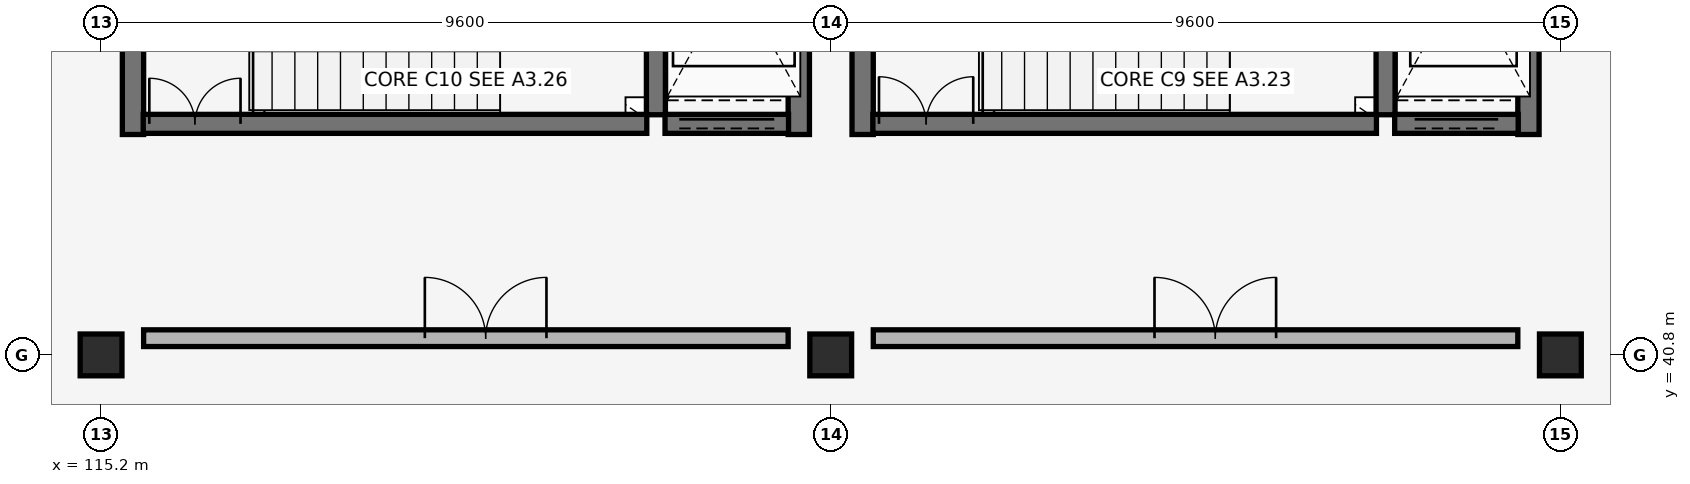
"""IFC4 building model, lengths in metres.
Left out: names, types, materials, properties, quantities, classifications, styles, units other than length and angle.
Written with IfcOpenShell. Run it as: python <this file> out.ifc"""

import sys

from ifc_helpers import new_model, si_unit, direction, frame, frame_2d, origin, origin_2d, place, context, subcontext, project, spatial, rectangle, extrude, element, fill, save


model = new_model("IFC4")
c1 = context("Model", 3, precision=1e-05, world=origin(), true_north=direction((0.0, 1.0)))
c2 = subcontext(c1, "Body", "Model", "MODEL_VIEW")
j1 = project(units=[si_unit("LENGTHUNIT", "METRE"), si_unit("PLANEANGLEUNIT", "RADIAN")], contexts=[c1])
p1 = place(None, origin())
s1 = spatial("IfcSite", under=j1, at=p1, CompositionType="ELEMENT")
p2 = place(p1, origin())
s2 = spatial("IfcBuilding", under=s1, at=p2, CompositionType="ELEMENT")
p3 = place(p2, frame((0.0, 0.0, 12.58)))
s3 = spatial("IfcBuildingStorey", under=s2, at=p3, CompositionType="ELEMENT", Elevation=12.58)
for number, where, z_axis, x_axis in (
    (1, (115.2, 40.8, 0.0), (0.0, 0.0, 1.0), (1.0, 0.0, 0.0)),
    (2, (124.8, 40.8, 0.0), (0.0, 0.0, 1.0), (1.0, 0.0, 0.0)),
    (3, (134.4, 40.8, 0.0), (0.0, 0.0, 1.0), (1.0, 0.0, 0.0)),
):
    element("IfcColumn", number, at=place(p3, frame(where, z_axis=z_axis, x_axis=x_axis)), inside=s3, PredefinedType="COLUMN", context=c2, shape_type="SweptSolid", body=[
        extrude(rectangle(XDim=0.55, YDim=0.55, at=origin_2d()), origin(), (0.0, 0.0, 1.0), 4.08),
    ])
for number, where, z_axis, x_axis in (
    (4, (125.22, 43.7, 0.0), (0.0, 0.0, 1.0), (0.0, 1.0, 0.0)),
    (5, (133.98, 43.7, 0.0), (0.0, 0.0, 1.0), (0.0, 1.0, 0.0)),
):
    element("IfcWall", number, at=place(p3, frame(where, z_axis=z_axis, x_axis=x_axis)), inside=s3, PredefinedType="SHEAR", context=c2, shape_type="SweptSolid", body=[
        extrude(rectangle(XDim=4.08, YDim=0.28, at=frame_2d((2.04, 0.0))), origin(), (0.0, 0.0, 1.0), 3.78),
    ])
p4 = place(p3, frame((132.1, 43.96, 0.0), z_axis=(0.0, 0.0, 1.0), x_axis=(0.0, 1.0, 0.0)))
e6 = element("IfcWall", 6, at=p4, inside=s3, PredefinedType="SHEAR", context=c2, shape_type="SweptSolid", body=[
    extrude(rectangle(XDim=3.54, YDim=0.25, at=frame_2d((1.77, 0.0))), origin(), (0.0, 0.0, 1.0), 3.78),
])
p5 = place(p3, frame((125.355, 43.84, 0.0), z_axis=(0.0, 0.0, 1.0), x_axis=(1.0, 0.0, 0.0)))
e7 = element("IfcWall", 7, at=p5, inside=s3, PredefinedType="SHEAR", context=c2, shape_type="SweptSolid", body=[
    extrude(rectangle(XDim=6.625, YDim=0.25, at=frame_2d((3.312, 0.0))), origin(), (0.0, 0.0, 1.0), 3.78),
])
p6 = place(p5, frame((0.08, 0.0, 0.0)))
e8 = element("IfcOpeningElement", 8, at=p6, cuts=e7, PredefinedType="OPENING", context=c2, shape_type="SweptSolid", body=[
    extrude(rectangle(XDim=1.24, YDim=2.15, at=frame_2d((0.62, 1.075))), frame((0.0, 0.135, 0.0), z_axis=(0.0, -1.0, 0.0), x_axis=(1.0, 0.0, 0.0)), (0.0, 0.0, 1.0), 0.27),
])
p7 = place(p3, frame((125.36, 41.02, 0.0), z_axis=(0.0, 0.0, 1.0), x_axis=(1.0, 0.0, 0.0)))
e9 = element("IfcWall", 9, at=p7, inside=s3, PredefinedType="PARTITIONING", context=c2, shape_type="SweptSolid", body=[
    extrude(rectangle(XDim=8.48, YDim=0.22, at=frame_2d((4.24, 0.0))), origin(), (0.0, 0.0, 1.0), 3.06),
])
p8 = place(p7, frame((3.7, 0.0, 0.0)))
e10 = element("IfcOpeningElement", 10, at=p8, cuts=e9, PredefinedType="OPENING", context=c2, shape_type="SweptSolid", body=[
    extrude(rectangle(XDim=1.6, YDim=2.2, at=frame_2d((0.8, 1.1))), frame((0.0, 0.12, 0.0), z_axis=(0.0, -1.0, 0.0), x_axis=(1.0, 0.0, 0.0)), (0.0, 0.0, 1.0), 0.24),
])
p9 = place(p3, frame((132.22, 43.84, 0.0), z_axis=(0.0, 0.0, 1.0), x_axis=(1.0, 0.0, 0.0)))
e11 = element("IfcWall", 11, at=p9, inside=s3, PredefinedType="SHEAR", context=c2, shape_type="SweptSolid", body=[
    extrude(rectangle(XDim=1.625, YDim=0.25, at=frame_2d((0.812, 0.0))), origin(), (0.0, 0.0, 1.0), 3.78),
])
p10 = place(p9, frame((0.262, 0.0, 0.0)))
e12 = element("IfcOpeningElement", 12, at=p10, cuts=e11, PredefinedType="OPENING", context=c2, shape_type="SweptSolid", body=[
    extrude(rectangle(XDim=1.1, YDim=2.15, at=frame_2d((0.55, 1.075))), frame((0.0, 0.135, 0.0), z_axis=(0.0, -1.0, 0.0), x_axis=(1.0, 0.0, 0.0)), (0.0, 0.0, 1.0), 0.27),
])
for number, where, z_axis, x_axis in (
    (13, (115.62, 43.7, 0.0), (0.0, 0.0, 1.0), (0.0, 1.0, 0.0)),
    (14, (124.38, 43.7, 0.0), (0.0, 0.0, 1.0), (0.0, 1.0, 0.0)),
):
    element("IfcWall", number, at=place(p3, frame(where, z_axis=z_axis, x_axis=x_axis)), inside=s3, PredefinedType="SHEAR", context=c2, shape_type="SweptSolid", body=[
        extrude(rectangle(XDim=4.08, YDim=0.28, at=frame_2d((2.04, 0.0))), origin(), (0.0, 0.0, 1.0), 3.78),
    ])
p11 = place(p3, frame((122.5, 43.96, 0.0), z_axis=(0.0, 0.0, 1.0), x_axis=(0.0, 1.0, 0.0)))
e15 = element("IfcWall", 15, at=p11, inside=s3, PredefinedType="SHEAR", context=c2, shape_type="SweptSolid", body=[
    extrude(rectangle(XDim=3.54, YDim=0.25, at=frame_2d((1.77, 0.0))), origin(), (0.0, 0.0, 1.0), 3.78),
])
p12 = place(p3, frame((115.755, 43.84, 0.0), z_axis=(0.0, 0.0, 1.0), x_axis=(1.0, 0.0, 0.0)))
e16 = element("IfcWall", 16, at=p12, inside=s3, PredefinedType="SHEAR", context=c2, shape_type="SweptSolid", body=[
    extrude(rectangle(XDim=6.625, YDim=0.25, at=frame_2d((3.312, 0.0))), origin(), (0.0, 0.0, 1.0), 3.78),
])
p13 = place(p12, frame((0.08, 0.0, 0.0)))
e17 = element("IfcOpeningElement", 17, at=p13, cuts=e16, PredefinedType="OPENING", context=c2, shape_type="SweptSolid", body=[
    extrude(rectangle(XDim=1.2, YDim=2.15, at=frame_2d((0.6, 1.075))), frame((0.0, 0.135, 0.0), z_axis=(0.0, -1.0, 0.0), x_axis=(1.0, 0.0, 0.0)), (0.0, 0.0, 1.0), 0.27),
])
p14 = place(p3, frame((115.76, 41.02, 0.0), z_axis=(0.0, 0.0, 1.0), x_axis=(1.0, 0.0, 0.0)))
e18 = element("IfcWall", 18, at=p14, inside=s3, PredefinedType="PARTITIONING", context=c2, shape_type="SweptSolid", body=[
    extrude(rectangle(XDim=8.48, YDim=0.22, at=frame_2d((4.24, 0.0))), origin(), (0.0, 0.0, 1.0), 3.06),
])
p15 = place(p14, frame((3.7, 0.0, 0.0)))
e19 = element("IfcOpeningElement", 19, at=p15, cuts=e18, PredefinedType="OPENING", context=c2, shape_type="SweptSolid", body=[
    extrude(rectangle(XDim=1.6, YDim=2.2, at=frame_2d((0.8, 1.1))), frame((0.0, 0.12, 0.0), z_axis=(0.0, -1.0, 0.0), x_axis=(1.0, 0.0, 0.0)), (0.0, 0.0, 1.0), 0.24),
])
p16 = place(p3, frame((122.62, 43.84, 0.0), z_axis=(0.0, 0.0, 1.0), x_axis=(1.0, 0.0, 0.0)))
e20 = element("IfcWall", 20, at=p16, inside=s3, PredefinedType="SHEAR", context=c2, shape_type="SweptSolid", body=[
    extrude(rectangle(XDim=1.625, YDim=0.25, at=frame_2d((0.812, 0.0))), origin(), (0.0, 0.0, 1.0), 3.78),
])
p17 = place(p16, frame((0.188, 0.0, 0.0)))
e21 = element("IfcOpeningElement", 21, at=p17, cuts=e20, PredefinedType="OPENING", context=c2, shape_type="SweptSolid", body=[
    extrude(rectangle(XDim=1.25, YDim=2.15, at=frame_2d((0.625, 1.075))), frame((0.0, 0.135, 0.0), z_axis=(0.0, -1.0, 0.0), x_axis=(1.0, 0.0, 0.0)), (0.0, 0.0, 1.0), 0.27),
])
p18 = place(p6, origin())
e22 = element("IfcDoor", 22, at=p18, inside=s3, OperationType="DOUBLE_DOOR_SINGLE_SWING", PredefinedType="DOOR", context=c2, shape_type="SweptSolid", body=[
    extrude(rectangle(XDim=1.24, YDim=2.15, at=frame_2d((0.62, 1.075))), frame((0.0, 0.025, 0.0), z_axis=(0.0, -1.0, 0.0), x_axis=(1.0, 0.0, 0.0)), (0.0, 0.0, 1.0), 0.05),
])
fill(e8, e22)
p19 = place(p8, origin())
e23 = element("IfcDoor", 23, at=p19, inside=s3, OperationType="DOUBLE_DOOR_SINGLE_SWING", PredefinedType="DOOR", context=c2, shape_type="SweptSolid", body=[
    extrude(rectangle(XDim=1.6, YDim=2.2, at=frame_2d((0.8, 1.1))), frame((0.0, 0.025, 0.0), z_axis=(0.0, -1.0, 0.0), x_axis=(1.0, 0.0, 0.0)), (0.0, 0.0, 1.0), 0.05),
])
fill(e10, e23)
p20 = place(p10, origin())
e24 = element("IfcDoor", 24, at=p20, inside=s3, OperationType="DOUBLE_DOOR_SLIDING", PredefinedType="DOOR", context=c2, shape_type="SweptSolid", body=[
    extrude(rectangle(XDim=1.1, YDim=2.15, at=frame_2d((0.55, 1.075))), frame((0.0, 0.025, 0.0), z_axis=(0.0, -1.0, 0.0), x_axis=(1.0, 0.0, 0.0)), (0.0, 0.0, 1.0), 0.05),
])
fill(e12, e24)
p21 = place(p13, origin())
e25 = element("IfcDoor", 25, at=p21, inside=s3, OperationType="DOUBLE_DOOR_SINGLE_SWING", PredefinedType="DOOR", context=c2, shape_type="SweptSolid", body=[
    extrude(rectangle(XDim=1.2, YDim=2.15, at=frame_2d((0.6, 1.075))), frame((0.0, 0.025, 0.0), z_axis=(0.0, -1.0, 0.0), x_axis=(1.0, 0.0, 0.0)), (0.0, 0.0, 1.0), 0.05),
])
fill(e17, e25)
p22 = place(p15, origin())
e26 = element("IfcDoor", 26, at=p22, inside=s3, OperationType="DOUBLE_DOOR_SINGLE_SWING", PredefinedType="DOOR", context=c2, shape_type="SweptSolid", body=[
    extrude(rectangle(XDim=1.6, YDim=2.2, at=frame_2d((0.8, 1.1))), frame((0.0, 0.025, 0.0), z_axis=(0.0, -1.0, 0.0), x_axis=(1.0, 0.0, 0.0)), (0.0, 0.0, 1.0), 0.05),
])
fill(e19, e26)
p23 = place(p17, origin())
e27 = element("IfcDoor", 27, at=p23, inside=s3, OperationType="DOUBLE_DOOR_SLIDING", PredefinedType="DOOR", context=c2, shape_type="SweptSolid", body=[
    extrude(rectangle(XDim=1.25, YDim=2.15, at=frame_2d((0.625, 1.075))), frame((0.0, 0.025, 0.0), z_axis=(0.0, -1.0, 0.0), x_axis=(1.0, 0.0, 0.0)), (0.0, 0.0, 1.0), 0.05),
])
fill(e21, e27)
save(model, sys.argv[1])
